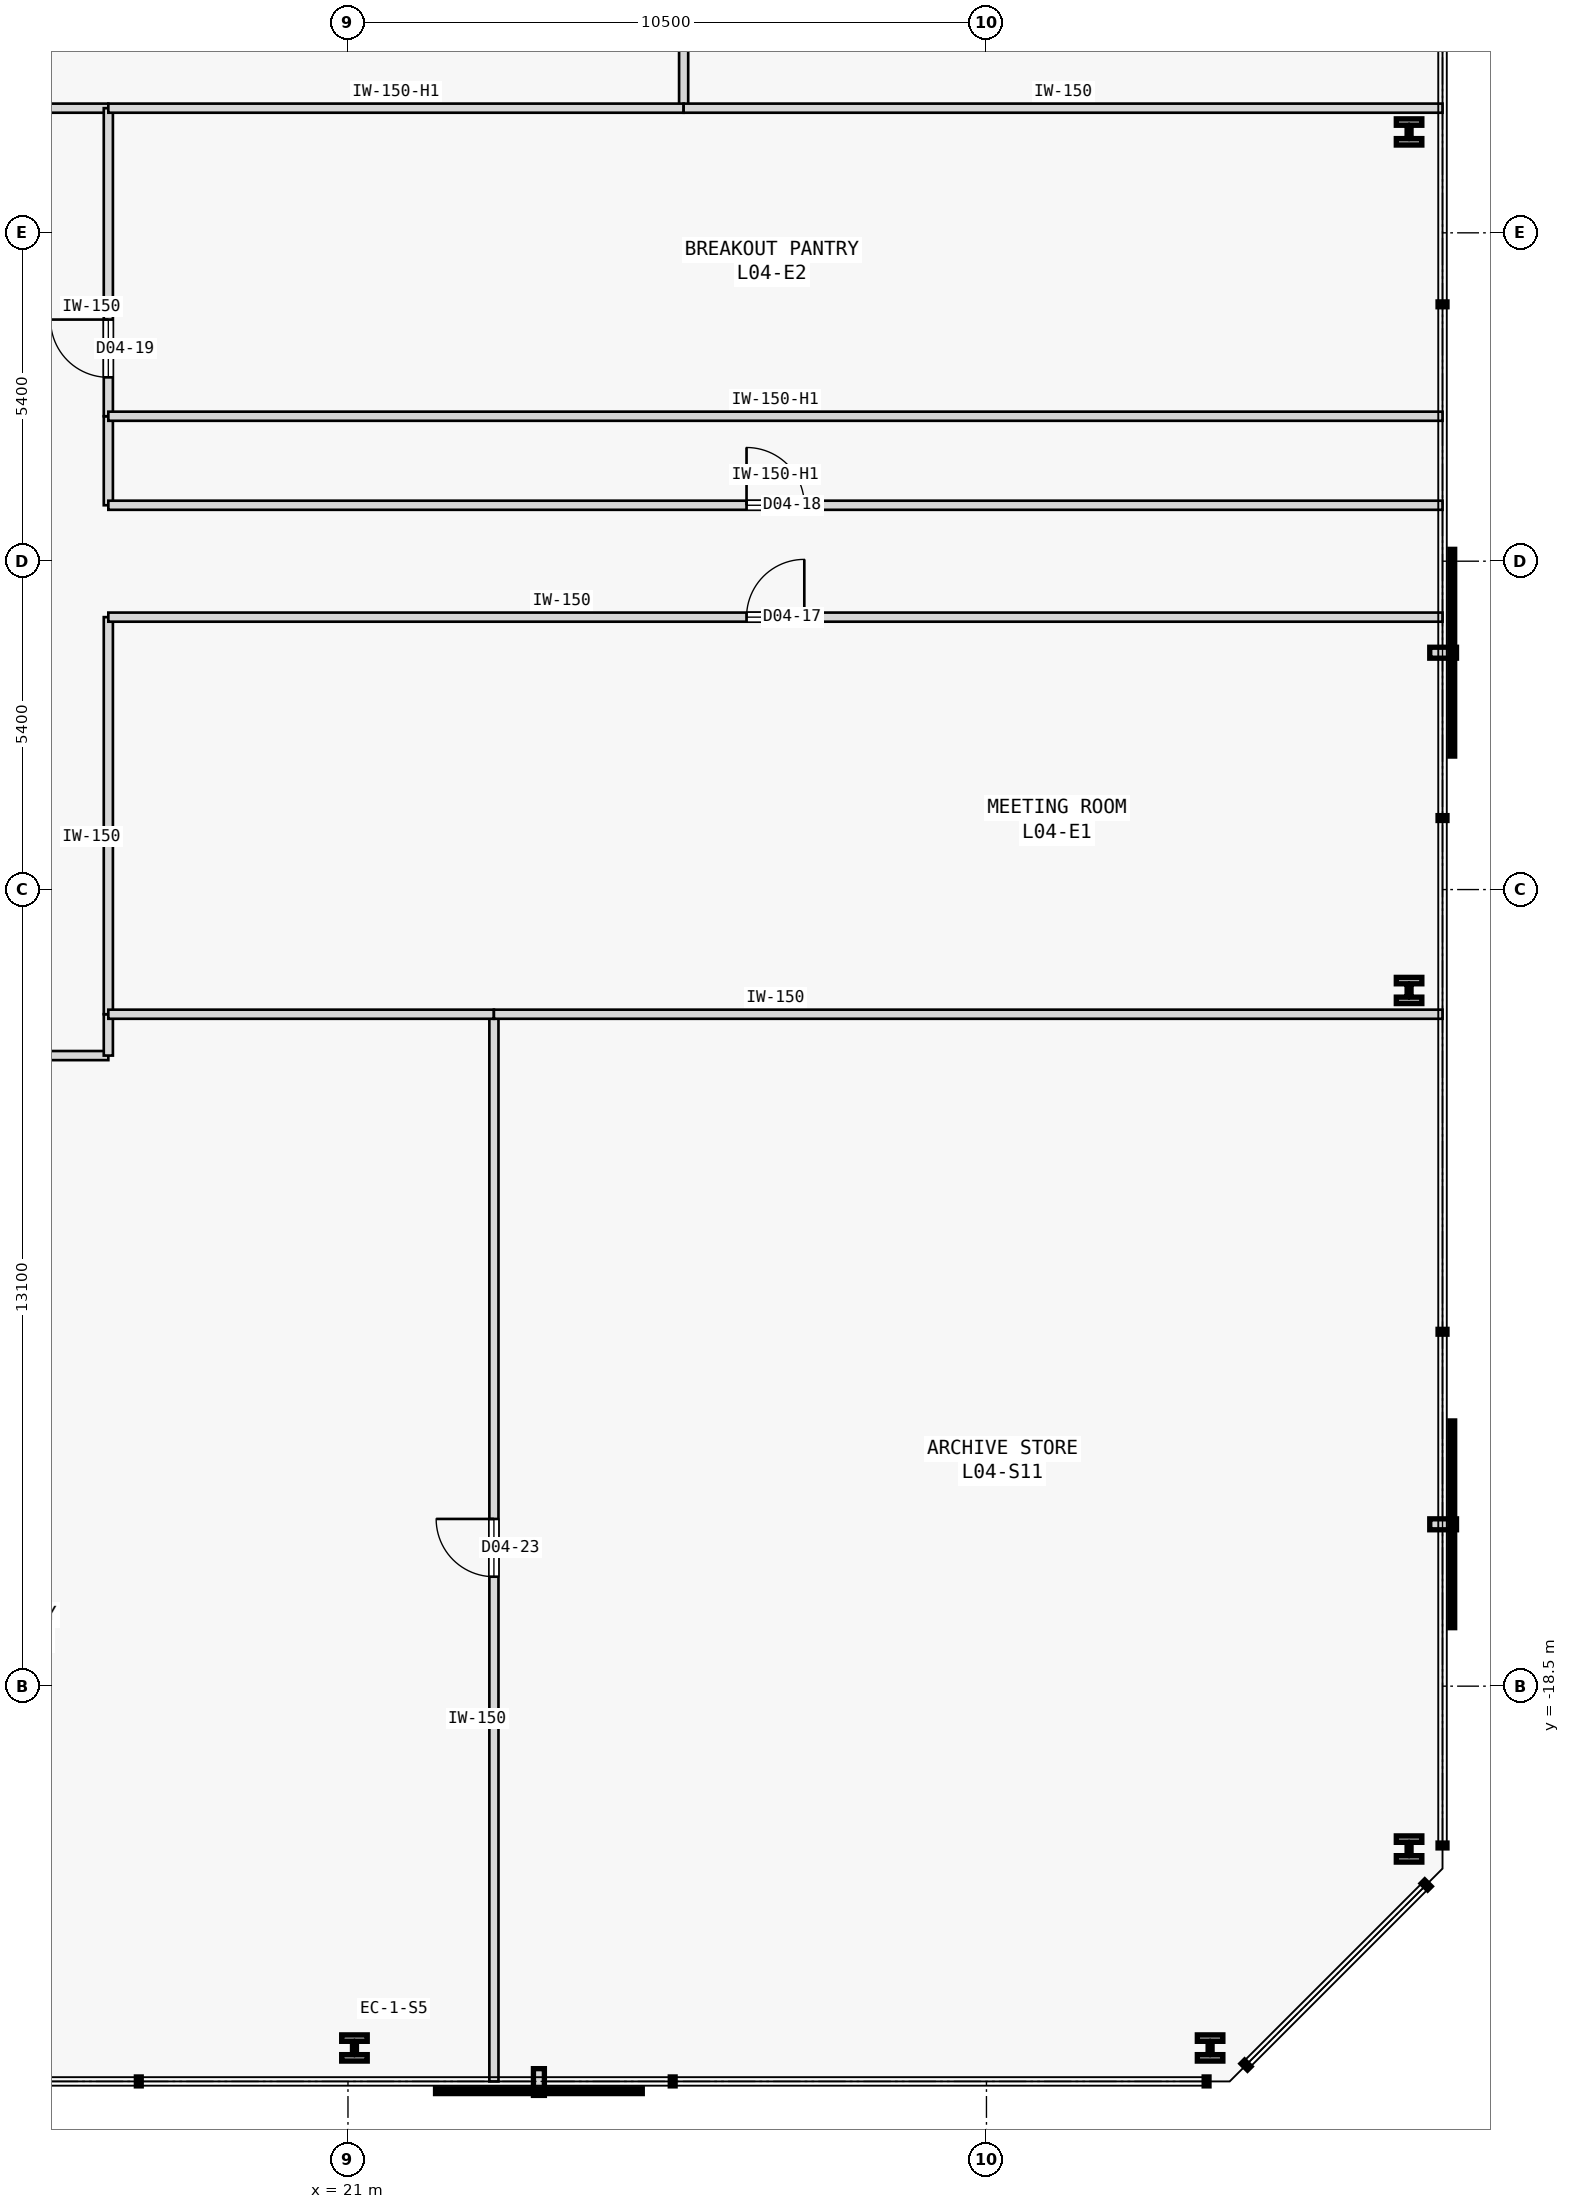
"""IFC4 building model, lengths in metres.
Left out: names, types, materials, properties, quantities, classifications, styles, units other than length and angle.
Written with IfcOpenShell. Run it as: python <this file> out.ifc"""

import sys

from ifc_helpers import new_model, si_unit, direction, frame, frame_2d, origin, origin_2d, place, context, subcontext, project, spatial, rectangle, i_section, extrude, element, fill, save


model = new_model("IFC4")
c1 = context("Model", 3, precision=1e-05, world=origin(), true_north=direction((0.0, 1.0)))
c2 = subcontext(c1, "Body", "Model", "MODEL_VIEW")
j1 = project(units=[si_unit("LENGTHUNIT", "METRE"), si_unit("PLANEANGLEUNIT", "RADIAN")], contexts=[c1])
p1 = place(None, origin())
s1 = spatial("IfcSite", under=j1, at=p1, CompositionType="ELEMENT")
p2 = place(p1, origin())
s2 = spatial("IfcBuilding", under=s1, at=p2, CompositionType="ELEMENT")
p3 = place(p2, frame((0.0, 0.0, 21.8)))
s3 = spatial("IfcBuildingStorey", under=s2, at=p3, CompositionType="ELEMENT", Elevation=21.8)
for number, where, z_axis, x_axis in (
    (1, (21.107, -24.45, 0.0), (0.0, 0.0, 1.0), (1.0, 0.0, 0.0)),
    (2, (35.178, -24.45, 0.0), (0.0, 0.0, 1.0), (1.0, 0.0, 0.0)),
    (3, (38.45, -21.178, 0.0), (0.0, 0.0, 1.0), (1.0, 0.0, 0.0)),
    (4, (38.45, -7.059, 0.0), (0.0, 0.0, 1.0), (1.0, 0.0, 0.0)),
    (5, (38.45, 7.059, 0.0), (0.0, 0.0, 1.0), (1.0, 0.0, 0.0)),
):
    element("IfcColumn", number, at=place(p3, frame(where, z_axis=z_axis, x_axis=x_axis)), inside=s3, PredefinedType="COLUMN", context=c2, shape_type="SweptSolid", body=[
        extrude(i_section(OverallWidth=0.42, OverallDepth=0.431, WebThickness=0.065, FlangeThickness=0.106, FilletRadius=0.015, at=origin_2d()), origin(), (0.0, 0.0, 1.0), 3.8),
    ])
p4 = place(p3, frame((10.92, 7.45, 0.0), z_axis=(0.0, 0.0, 1.0), x_axis=(1.0, 0.0, 0.0)))
e6 = element("IfcWall", 6, at=p4, inside=s3, PredefinedType="PARTITIONING", context=c2, shape_type="SweptSolid", body=[
    extrude(rectangle(XDim=6.139, YDim=0.15, at=frame_2d((3.07, 0.0))), origin(), (0.0, 0.0, 1.0), 3.575),
])
p5 = place(p4, frame((2.594, 0.0, 0.0)))
e7 = element("IfcOpeningElement", 7, at=p5, cuts=e6, PredefinedType="OPENING", context=c2, shape_type="SweptSolid", body=[
    extrude(rectangle(XDim=0.95, YDim=2.15, at=frame_2d((0.475, 1.075))), frame((0.0, 0.085, 0.0), z_axis=(0.0, -1.0, 0.0), x_axis=(1.0, 0.0, 0.0)), (0.0, 0.0, 1.0), 0.17),
])
p6 = place(p3, frame((7.8, -8.13, 0.0), z_axis=(0.0, 0.0, 1.0), x_axis=(1.0, 0.0, 0.0)))
e8 = element("IfcWall", 8, at=p6, inside=s3, PredefinedType="PARTITIONING", context=c2, shape_type="SweptSolid", body=[
    extrude(rectangle(XDim=9.259, YDim=0.15, at=frame_2d((4.629, 0.0))), origin(), (0.0, 0.0, 1.0), 3.575),
])
p7 = place(p6, frame((4.155, 0.0, 0.0)))
e9 = element("IfcOpeningElement", 9, at=p7, cuts=e8, PredefinedType="OPENING", context=c2, shape_type="SweptSolid", body=[
    extrude(rectangle(XDim=0.95, YDim=2.15, at=frame_2d((0.475, 1.075))), frame((0.0, 0.085, 0.0), z_axis=(0.0, -1.0, 0.0), x_axis=(1.0, 0.0, 0.0)), (0.0, 0.0, 1.0), 0.17),
])
p8 = place(p3, frame((17.059, -8.13, 0.0), z_axis=(0.0, 0.0, 1.0), x_axis=(0.0, 1.0, 0.0)))
e10 = element("IfcWall", 10, at=p8, inside=s3, PredefinedType="PARTITIONING", context=c2, shape_type="SweptSolid", body=[
    extrude(rectangle(XDim=0.68, YDim=0.15, at=frame_2d((0.34, 0.0))), origin(), (0.0, 0.0, 1.0), 3.575),
])
p9 = place(p3, frame((17.059, -7.45, 0.0), z_axis=(0.0, 0.0, 1.0), x_axis=(0.0, 1.0, 0.0)))
e11 = element("IfcWall", 11, at=p9, inside=s3, PredefinedType="PARTITIONING", context=c2, shape_type="SweptSolid", body=[
    extrude(rectangle(XDim=6.53, YDim=0.15, at=frame_2d((3.265, 0.0))), origin(), (0.0, 0.0, 1.0), 3.575),
])
p10 = place(p3, frame((17.059, -0.92, 0.0), z_axis=(0.0, 0.0, 1.0), x_axis=(1.0, 0.0, 0.0)))
e12 = element("IfcWall", 12, at=p10, inside=s3, PredefinedType="PARTITIONING", context=c2, shape_type="SweptSolid", body=[
    extrude(rectangle(XDim=21.941, YDim=0.15, at=frame_2d((10.97, 0.0))), origin(), (0.0, 0.0, 1.0), 3.575),
])
p11 = place(p10, frame((10.496, 0.0, 0.0)))
e13 = element("IfcOpeningElement", 13, at=p11, cuts=e12, PredefinedType="OPENING", context=c2, shape_type="SweptSolid", body=[
    extrude(rectangle(XDim=0.95, YDim=2.15, at=frame_2d((0.475, 1.075))), frame((0.0, 0.085, 0.0), z_axis=(0.0, -1.0, 0.0), x_axis=(1.0, 0.0, 0.0)), (0.0, 0.0, 1.0), 0.17),
])
p12 = place(p3, frame((17.059, 0.92, 0.0), z_axis=(0.0, 0.0, 1.0), x_axis=(0.0, 1.0, 0.0)))
e14 = element("IfcWall", 14, at=p12, inside=s3, PredefinedType="PARTITIONING", context=c2, shape_type="SweptSolid", body=[
    extrude(rectangle(XDim=1.464, YDim=0.15, at=frame_2d((0.732, 0.0))), origin(), (0.0, 0.0, 1.0), 3.575),
])
p13 = place(p3, frame((17.059, 0.92, 0.0), z_axis=(0.0, 0.0, 1.0), x_axis=(1.0, 0.0, 0.0)))
e15 = element("IfcWall", 15, at=p13, inside=s3, PredefinedType="PARTITIONING", context=c2, shape_type="SweptSolid", body=[
    extrude(rectangle(XDim=21.941, YDim=0.15, at=frame_2d((10.97, 0.0))), origin(), (0.0, 0.0, 1.0), 3.125),
])
p14 = place(p13, frame((10.496, 0.0, 0.0)))
e16 = element("IfcOpeningElement", 16, at=p14, cuts=e15, PredefinedType="OPENING", context=c2, shape_type="SweptSolid", body=[
    extrude(rectangle(XDim=0.95, YDim=2.15, at=frame_2d((0.475, 1.075))), frame((0.0, 0.085, 0.0), z_axis=(0.0, -1.0, 0.0), x_axis=(1.0, 0.0, 0.0)), (0.0, 0.0, 1.0), 0.17),
])
p15 = place(p3, frame((17.059, 2.384, 0.0), z_axis=(0.0, 0.0, 1.0), x_axis=(0.0, 1.0, 0.0)))
e17 = element("IfcWall", 17, at=p15, inside=s3, PredefinedType="PARTITIONING", context=c2, shape_type="SweptSolid", body=[
    extrude(rectangle(XDim=5.066, YDim=0.15, at=frame_2d((2.533, 0.0))), origin(), (0.0, 0.0, 1.0), 3.575),
])
p16 = place(p15, frame((0.639, 0.0, 0.0)))
e18 = element("IfcOpeningElement", 18, at=p16, cuts=e17, PredefinedType="OPENING", context=c2, shape_type="SweptSolid", body=[
    extrude(rectangle(XDim=0.95, YDim=2.15, at=frame_2d((0.475, 1.075))), frame((0.0, 0.085, 0.0), z_axis=(0.0, -1.0, 0.0), x_axis=(1.0, 0.0, 0.0)), (0.0, 0.0, 1.0), 0.17),
])
p17 = place(p3, frame((26.52, 7.45, 0.0), z_axis=(0.0, 0.0, 1.0), x_axis=(0.0, 1.0, 0.0)))
e19 = element("IfcWall", 19, at=p17, inside=s3, PredefinedType="PARTITIONING", context=c2, shape_type="SweptSolid", body=[
    extrude(rectangle(XDim=17.55, YDim=0.15, at=frame_2d((8.775, 0.0))), origin(), (0.0, 0.0, 1.0), 3.575),
])
p18 = place(p17, frame((8.3, 0.0, 0.0)))
e20 = element("IfcOpeningElement", 20, at=p18, cuts=e19, PredefinedType="OPENING", context=c2, shape_type="SweptSolid", body=[
    extrude(rectangle(XDim=0.95, YDim=2.15, at=frame_2d((0.475, 1.075))), frame((0.0, 0.085, 0.0), z_axis=(0.0, -1.0, 0.0), x_axis=(1.0, 0.0, 0.0)), (0.0, 0.0, 1.0), 0.17),
])
p19 = place(p3, frame((17.059, 7.45, 0.0), z_axis=(0.0, 0.0, 1.0), x_axis=(1.0, 0.0, 0.0)))
e21 = element("IfcWall", 21, at=p19, inside=s3, PredefinedType="PARTITIONING", context=c2, shape_type="SweptSolid", body=[
    extrude(rectangle(XDim=9.461, YDim=0.15, at=frame_2d((4.73, 0.0))), origin(), (0.0, 0.0, 1.0), 3.125),
])
p20 = place(p3, frame((26.52, 7.45, 0.0), z_axis=(0.0, 0.0, 1.0), x_axis=(1.0, 0.0, 0.0)))
e22 = element("IfcWall", 22, at=p20, inside=s3, PredefinedType="PARTITIONING", context=c2, shape_type="SweptSolid", body=[
    extrude(rectangle(XDim=12.48, YDim=0.15, at=frame_2d((6.24, 0.0))), origin(), (0.0, 0.0, 1.0), 3.575),
])
p21 = place(p3, frame((23.4, -25.0, 0.0), z_axis=(0.0, 0.0, 1.0), x_axis=(0.0, 1.0, 0.0)))
e23 = element("IfcWall", 23, at=p21, inside=s3, PredefinedType="PARTITIONING", context=c2, shape_type="SweptSolid", body=[
    extrude(rectangle(XDim=17.55, YDim=0.15, at=frame_2d((8.775, 0.0))), origin(), (0.0, 0.0, 1.0), 3.575),
])
p22 = place(p21, frame((8.3, 0.0, 0.0)))
e24 = element("IfcOpeningElement", 24, at=p22, cuts=e23, PredefinedType="OPENING", context=c2, shape_type="SweptSolid", body=[
    extrude(rectangle(XDim=0.95, YDim=2.15, at=frame_2d((0.475, 1.075))), frame((0.0, 0.085, 0.0), z_axis=(0.0, -1.0, 0.0), x_axis=(1.0, 0.0, 0.0)), (0.0, 0.0, 1.0), 0.17),
])
p23 = place(p3, frame((17.059, -7.45, 0.0), z_axis=(0.0, 0.0, 1.0), x_axis=(1.0, 0.0, 0.0)))
e25 = element("IfcWall", 25, at=p23, inside=s3, PredefinedType="PARTITIONING", context=c2, shape_type="SweptSolid", body=[
    extrude(rectangle(XDim=6.341, YDim=0.15, at=frame_2d((3.17, 0.0))), origin(), (0.0, 0.0, 1.0), 3.575),
])
p24 = place(p3, frame((23.4, -7.45, 0.0), z_axis=(0.0, 0.0, 1.0), x_axis=(1.0, 0.0, 0.0)))
e26 = element("IfcWall", 26, at=p24, inside=s3, PredefinedType="PARTITIONING", context=c2, shape_type="SweptSolid", body=[
    extrude(rectangle(XDim=15.6, YDim=0.15, at=frame_2d((7.8, 0.0))), origin(), (0.0, 0.0, 1.0), 3.575),
])
p25 = place(p3, frame((17.059, 2.384, 0.0), z_axis=(0.0, 0.0, 1.0), x_axis=(1.0, 0.0, 0.0)))
e27 = element("IfcWall", 27, at=p25, inside=s3, PredefinedType="PARTITIONING", context=c2, shape_type="SweptSolid", body=[
    extrude(rectangle(XDim=21.941, YDim=0.15, at=frame_2d((10.97, 0.0))), origin(), (0.0, 0.0, 1.0), 3.125),
])
p26 = place(p11, origin())
e28 = element("IfcDoor", 28, at=p26, inside=s3, OperationType="SINGLE_SWING_RIGHT", PredefinedType="DOOR", context=c2, shape_type="SweptSolid", body=[
    extrude(rectangle(XDim=0.95, YDim=2.15, at=frame_2d((0.475, 1.075))), frame((0.0, 0.025, 0.0), z_axis=(0.0, -1.0, 0.0), x_axis=(1.0, 0.0, 0.0)), (0.0, 0.0, 1.0), 0.05),
])
fill(e13, e28)
p27 = place(p14, origin())
e29 = element("IfcDoor", 29, at=p27, inside=s3, OperationType="SINGLE_SWING_LEFT", PredefinedType="DOOR", context=c2, shape_type="SweptSolid", body=[
    extrude(rectangle(XDim=0.95, YDim=2.15, at=frame_2d((0.475, 1.075))), frame((0.0, 0.025, 0.0), z_axis=(0.0, -1.0, 0.0), x_axis=(1.0, 0.0, 0.0)), (0.0, 0.0, 1.0), 0.05),
])
fill(e16, e29)
p28 = place(p16, origin())
e30 = element("IfcDoor", 30, at=p28, inside=s3, OperationType="SINGLE_SWING_RIGHT", PredefinedType="DOOR", context=c2, shape_type="SweptSolid", body=[
    extrude(rectangle(XDim=0.95, YDim=2.15, at=frame_2d((0.475, 1.075))), frame((0.0, 0.025, 0.0), z_axis=(0.0, -1.0, 0.0), x_axis=(1.0, 0.0, 0.0)), (0.0, 0.0, 1.0), 0.05),
])
fill(e18, e30)
p29 = place(p22, origin())
e31 = element("IfcDoor", 31, at=p29, inside=s3, OperationType="SINGLE_SWING_RIGHT", PredefinedType="DOOR", context=c2, shape_type="SweptSolid", body=[
    extrude(rectangle(XDim=0.95, YDim=2.15, at=frame_2d((0.475, 1.075))), frame((0.0, 0.025, 0.0), z_axis=(0.0, -1.0, 0.0), x_axis=(1.0, 0.0, 0.0)), (0.0, 0.0, 1.0), 0.05),
])
fill(e24, e31)
save(model, sys.argv[1])
